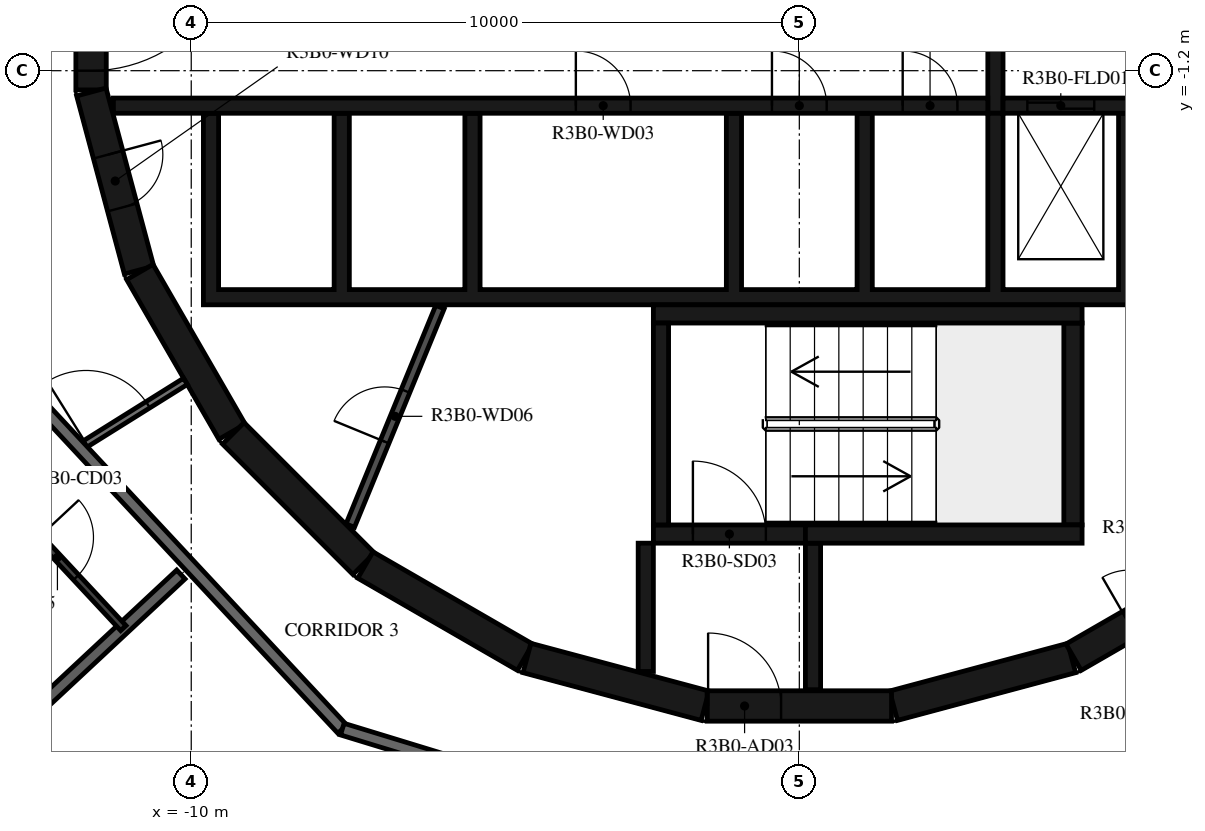
"""IFC4 building model, lengths in metres.
Left out: names, types, materials, properties, quantities, classifications, styles, units other than length and angle.
Written with IfcOpenShell. Run it as: python <this file> out.ifc"""

import sys

from ifc_helpers import new_model, si_unit, direction, frame, frame_2d, origin, place, context, subcontext, project, spatial, polyline, rectangle, outline, extrude, element, fill, save


model = new_model("IFC4")
c1 = context("Model", 3, precision=1e-05, world=origin(), true_north=direction((0.0, 1.0)))
c2 = subcontext(c1, "Body", "Model", "MODEL_VIEW")
j1 = project(units=[si_unit("LENGTHUNIT", "METRE"), si_unit("PLANEANGLEUNIT", "RADIAN")], contexts=[c1])
p1 = place(None, origin())
s1 = spatial("IfcSite", under=j1, at=p1, CompositionType="ELEMENT")
p2 = place(p1, origin())
s2 = spatial("IfcBuilding", under=s1, at=p2, CompositionType="ELEMENT")
p3 = place(p2, frame((0.0, 0.0, 127.4)))
s3 = spatial("IfcBuildingStorey", under=s2, at=p3, CompositionType="ELEMENT", Elevation=127.4)
p4 = place(p3, frame((1.55, -11.643, 0.0), z_axis=(0.0, 0.0, 1.0), x_axis=(0.965948410781, 0.258734743916, 0.0)))
e1 = element("IfcWall", 1, at=p4, inside=s3, PredefinedType="SHEAR", context=c2, shape_type="SweptSolid", body=[
    extrude(rectangle(XDim=3.033, YDim=0.5, at=frame_2d((1.516, 0.0))), origin(), (0.0, 0.0, 1.0), 3.12),
])
p5 = place(p3, frame((4.51, -10.845, 0.0), z_axis=(0.0, 0.0, 1.0), x_axis=(0.865975092491, 0.500087131594, 0.0)))
e2 = element("IfcWall", 2, at=p5, inside=s3, PredefinedType="SHEAR", context=c2, shape_type="SweptSolid", body=[
    extrude(rectangle(XDim=3.033, YDim=0.5, at=frame_2d((1.516, 0.0))), origin(), (0.0, 0.0, 1.0), 3.12),
])
p6 = place(p5, frame((1.066, 0.0, 0.0)))
e3 = element("IfcOpeningElement", 3, at=p6, cuts=e2, PredefinedType="OPENING", context=c2, shape_type="SweptSolid", body=[
    extrude(rectangle(XDim=0.9, YDim=2.1, at=frame_2d((0.45, 1.05))), frame((0.0, 0.26, 0.0), z_axis=(0.0, -1.0, 0.0), x_axis=(1.0, 0.0, 0.0)), (0.0, 0.0, 1.0), 0.52),
])
p7 = place(p3, frame((-11.647, 1.516, 0.0), z_axis=(0.0, 0.0, 1.0), x_axis=(0.0, -1.0, 0.0)))
e4 = element("IfcWall", 4, at=p7, inside=s3, PredefinedType="SHEAR", context=c2, shape_type="SweptSolid", body=[
    extrude(rectangle(XDim=3.033, YDim=0.5, at=frame_2d((1.516, 0.0))), origin(), (0.0, 0.0, 1.0), 3.12),
])
p8 = place(p7, frame((0.316, 0.0, 0.0)))
e5 = element("IfcOpeningElement", 5, at=p8, cuts=e4, PredefinedType="OPENING", context=c2, shape_type="SweptSolid", body=[
    extrude(rectangle(XDim=2.4, YDim=2.1, at=frame_2d((1.2, 1.05))), frame((0.0, 0.26, 0.0), z_axis=(0.0, -1.0, 0.0), x_axis=(1.0, 0.0, 0.0)), (0.0, 0.0, 1.0), 0.52),
])
p9 = place(p3, frame((-11.643, -1.55, 0.0), z_axis=(0.0, 0.0, 1.0), x_axis=(0.258734743916, -0.965948410781, 0.0)))
e6 = element("IfcWall", 6, at=p9, inside=s3, PredefinedType="SHEAR", context=c2, shape_type="SweptSolid", body=[
    extrude(rectangle(XDim=3.033, YDim=0.5, at=frame_2d((1.516, 0.0))), origin(), (0.0, 0.0, 1.0), 3.12),
])
p10 = place(p9, frame((1.066, 0.0, 0.0)))
e7 = element("IfcOpeningElement", 7, at=p10, cuts=e6, PredefinedType="OPENING", context=c2, shape_type="SweptSolid", body=[
    extrude(rectangle(XDim=0.9, YDim=2.1, at=frame_2d((0.45, 1.05))), frame((0.0, 0.26, 0.0), z_axis=(0.0, -1.0, 0.0), x_axis=(1.0, 0.0, 0.0)), (0.0, 0.0, 1.0), 0.52),
])
p11 = place(p3, frame((-10.845, -4.51, 0.0), z_axis=(0.0, 0.0, 1.0), x_axis=(0.500087131594, -0.865975092491, 0.0)))
e8 = element("IfcWall", 8, at=p11, inside=s3, PredefinedType="SHEAR", context=c2, shape_type="SweptSolid", body=[
    extrude(rectangle(XDim=3.033, YDim=0.5, at=frame_2d((1.516, 0.0))), origin(), (0.0, 0.0, 1.0), 3.12),
])
p12 = place(p3, frame((-9.308, -7.164, 0.0), z_axis=(0.0, 0.0, 1.0), x_axis=(0.707106781187, -0.707106781187, 0.0)))
e9 = element("IfcWall", 9, at=p12, inside=s3, PredefinedType="SHEAR", context=c2, shape_type="SweptSolid", body=[
    extrude(rectangle(XDim=3.032, YDim=0.5, at=frame_2d((1.516, 0.0))), origin(), (0.0, 0.0, 1.0), 3.12),
])
for number, where, z_axis, x_axis in (
    (10, (-7.137, -9.329, 0.0), (0.0, 0.0, 1.0), (0.866, -0.5, 0.0)),
    (11, (-4.479, -10.858, 0.0), (0.0, 0.0, 1.0), (0.966, -0.259, 0.0)),
):
    element("IfcWall", number, at=place(p3, frame(where, z_axis=z_axis, x_axis=x_axis)), inside=s3, PredefinedType="SHEAR", context=c2, shape_type="SweptSolid", body=[
        extrude(rectangle(XDim=3.033, YDim=0.5, at=frame_2d((1.516, 0.0))), origin(), (0.0, 0.0, 1.0), 3.12),
    ])
p13 = place(p3, frame((-1.516, -11.647, 0.0), z_axis=(0.0, 0.0, 1.0), x_axis=(1.0, 0.0, 0.0)))
e12 = element("IfcWall", 12, at=p13, inside=s3, PredefinedType="SHEAR", context=c2, shape_type="SweptSolid", body=[
    extrude(rectangle(XDim=3.033, YDim=0.5, at=frame_2d((1.516, 0.0))), origin(), (0.0, 0.0, 1.0), 3.12),
])
p14 = place(p13, frame((0.016, 0.0, 0.0)))
e13 = element("IfcOpeningElement", 13, at=p14, cuts=e12, PredefinedType="OPENING", context=c2, shape_type="SweptSolid", body=[
    extrude(rectangle(XDim=1.2, YDim=2.1, at=frame_2d((0.6, 1.05))), frame((0.0, 0.26, 0.0), z_axis=(0.0, -1.0, 0.0), x_axis=(1.0, 0.0, 0.0)), (0.0, 0.0, 1.0), 0.52),
])
p15 = place(p3, frame((-2.275, -8.67, 0.0), z_axis=(0.0, 0.0, 1.0), x_axis=(0.0, 1.0, 0.0)))
e14 = element("IfcWall", 14, at=p15, inside=s3, PredefinedType="SHEAR", context=c2, shape_type="SweptSolid", body=[
    extrude(rectangle(XDim=3.32, YDim=0.25, at=frame_2d((1.66, 0.0))), origin(), (0.0, 0.0, 1.0), 3.12),
])
p16 = place(p3, frame((-2.4, -5.2, 0.0), z_axis=(0.0, 0.0, 1.0), x_axis=(1.0, 0.0, 0.0)))
e15 = element("IfcWall", 15, at=p16, inside=s3, PredefinedType="SHEAR", context=c2, shape_type="SweptSolid", body=[
    extrude(rectangle(XDim=7.05, YDim=0.3, at=frame_2d((3.525, 0.0))), origin(), (0.0, 0.0, 1.0), 3.12),
])
p17 = place(p3, frame((4.5, -8.67, 0.0), z_axis=(0.0, 0.0, 1.0), x_axis=(0.0, 1.0, 0.0)))
e16 = element("IfcWall", 16, at=p17, inside=s3, PredefinedType="SHEAR", context=c2, shape_type="SweptSolid", body=[
    extrude(rectangle(XDim=3.32, YDim=0.3, at=frame_2d((1.66, 0.0))), origin(), (0.0, 0.0, 1.0), 3.12),
])
p18 = place(p3, frame((0.1, -8.82, 0.0), z_axis=(0.0, 0.0, 1.0), x_axis=(1.0, 0.0, 0.0)))
e17 = element("IfcWall", 17, at=p18, inside=s3, PredefinedType="SHEAR", context=c2, shape_type="SweptSolid", body=[
    extrude(rectangle(XDim=4.55, YDim=0.3, at=frame_2d((2.275, 0.0))), origin(), (0.0, 0.0, 1.0), 3.12),
])
p19 = place(p3, frame((-2.4, -8.82, 0.0), z_axis=(0.0, 0.0, 1.0), x_axis=(1.0, 0.0, 0.0)))
e18 = element("IfcWall", 18, at=p19, inside=s3, PredefinedType="SHEAR", context=c2, shape_type="SweptSolid", body=[
    extrude(rectangle(XDim=2.5, YDim=0.3, at=frame_2d((1.25, 0.0))), origin(), (0.0, 0.0, 1.0), 3.12),
])
p20 = place(p19, frame((0.65, 0.0, 0.0)))
e19 = element("IfcOpeningElement", 19, at=p20, cuts=e18, PredefinedType="OPENING", context=c2, shape_type="SweptSolid", body=[
    extrude(rectangle(XDim=1.2, YDim=2.1, at=frame_2d((0.6, 1.05))), frame((0.0, 0.16, 0.0), z_axis=(0.0, -1.0, 0.0), x_axis=(1.0, 0.0, 0.0)), (0.0, 0.0, 1.0), 0.32),
])
p21 = place(p3, frame((-2.525, -8.97, 0.0), z_axis=(0.0, 0.0, 1.0), x_axis=(0.0, -1.0, 0.0)))
e20 = element("IfcWall", 20, at=p21, inside=s3, PredefinedType="SHEAR", context=c2, shape_type="SweptSolid", body=[
    extrude(rectangle(XDim=2.11, YDim=0.25, at=frame_2d((1.055, 0.0))), origin(), (0.0, 0.0, 1.0), 3.12),
])
p22 = place(p3, frame((0.225, -8.97, 0.0), z_axis=(0.0, 0.0, 1.0), x_axis=(0.0, -1.0, 0.0)))
e21 = element("IfcWall", 21, at=p22, inside=s3, PredefinedType="SHEAR", context=c2, shape_type="SweptSolid", body=[
    extrude(rectangle(XDim=2.41, YDim=0.25, at=frame_2d((1.205, 0.0))), origin(), (0.0, 0.0, 1.0), 3.12),
])
p23 = place(p3, origin())
e22 = element("IfcWall", 22, at=p23, inside=s3, PredefinedType="SHEAR", context=c2, shape_type="SweptSolid", body=[
    extrude(outline(polyline([(9.8, -5.05), (9.8, -4.8), (9.8, -1.9), (9.55, -1.9), (9.55, -4.8), (7.65, -4.8), (7.65, -1.9), (7.4, -1.9), (7.4, -4.8), (5.5, -4.8), (5.5, -1.9), (5.25, -1.9), (5.25, -4.8), (3.35, -4.8), (3.35, -1.9), (3.1, -1.9), (3.1, -4.8), (1.2, -4.8), (1.2, -1.9), (0.95, -1.9), (0.95, -4.8), (-0.95, -4.8), (-0.95, -1.9), (-1.2, -1.9), (-1.2, -4.8), (-5.25, -4.8), (-5.25, -1.9), (-5.5, -1.9), (-5.5, -4.8), (-7.4, -4.8), (-7.4, -1.9), (-7.65, -1.9), (-7.65, -4.8), (-9.55, -4.8), (-9.55, -1.9), (-9.8, -1.9), (-9.8, -4.8), (-9.8, -5.05), (9.8, -5.05)])), origin(), (0.0, 0.0, 1.0), 3.12),
])
p24 = place(p3, frame((-11.28, -1.775, 0.0), z_axis=(0.0, 0.0, 1.0), x_axis=(1.0, 0.0, 0.0)))
e23 = element("IfcWall", 23, at=p24, inside=s3, PredefinedType="SHEAR", context=c2, shape_type="SweptSolid", body=[
    extrude(rectangle(XDim=14.38, YDim=0.25, at=frame_2d((7.19, 0.0))), origin(), (0.0, 0.0, 1.0), 3.12),
])
p25 = place(p24, frame((7.605, 0.0, 0.0)))
e24 = element("IfcOpeningElement", 24, at=p25, cuts=e23, PredefinedType="OPENING", context=c2, shape_type="SweptSolid", body=[
    extrude(rectangle(XDim=0.9, YDim=2.1, at=frame_2d((0.45, 1.05))), frame((0.0, 0.135, 0.0), z_axis=(0.0, -1.0, 0.0), x_axis=(1.0, 0.0, 0.0)), (0.0, 0.0, 1.0), 0.27),
])
p26 = place(p24, frame((10.83, 0.0, 0.0)))
e25 = element("IfcOpeningElement", 25, at=p26, cuts=e23, PredefinedType="OPENING", context=c2, shape_type="SweptSolid", body=[
    extrude(rectangle(XDim=0.9, YDim=2.1, at=frame_2d((0.45, 1.05))), frame((0.0, 0.135, 0.0), z_axis=(0.0, -1.0, 0.0), x_axis=(1.0, 0.0, 0.0)), (0.0, 0.0, 1.0), 0.27),
])
p27 = place(p24, frame((12.98, 0.0, 0.0)))
e26 = element("IfcOpeningElement", 26, at=p27, cuts=e23, PredefinedType="OPENING", context=c2, shape_type="SweptSolid", body=[
    extrude(rectangle(XDim=0.9, YDim=2.1, at=frame_2d((0.45, 1.05))), frame((0.0, 0.135, 0.0), z_axis=(0.0, -1.0, 0.0), x_axis=(1.0, 0.0, 0.0)), (0.0, 0.0, 1.0), 0.27),
])
p28 = place(p3, frame((3.35, -1.775, 0.0), z_axis=(0.0, 0.0, 1.0), x_axis=(1.0, 0.0, 0.0)))
e27 = element("IfcWall", 27, at=p28, inside=s3, PredefinedType="SHEAR", context=c2, shape_type="SweptSolid", body=[
    extrude(rectangle(XDim=7.93, YDim=0.25, at=frame_2d((3.965, 0.0))), origin(), (0.0, 0.0, 1.0), 3.12),
])
p29 = place(p28, frame((0.4, 0.0, 0.0)))
e28 = element("IfcOpeningElement", 28, at=p29, cuts=e27, PredefinedType="OPENING", context=c2, shape_type="SweptSolid", body=[
    extrude(rectangle(XDim=1.1, YDim=2.4, at=frame_2d((0.55, 1.2))), frame((0.0, 0.135, 0.0), z_axis=(0.0, -1.0, 0.0), x_axis=(1.0, 0.0, 0.0)), (0.0, 0.0, 1.0), 0.27),
])
p30 = place(p28, frame((2.55, 0.0, 0.0)))
e29 = element("IfcOpeningElement", 29, at=p30, cuts=e27, PredefinedType="OPENING", context=c2, shape_type="SweptSolid", body=[
    extrude(rectangle(XDim=1.1, YDim=2.4, at=frame_2d((0.55, 1.2))), frame((0.0, 0.135, 0.0), z_axis=(0.0, -1.0, 0.0), x_axis=(1.0, 0.0, 0.0)), (0.0, 0.0, 1.0), 0.27),
])
p31 = place(p28, frame((4.7, 0.0, 0.0)))
e30 = element("IfcOpeningElement", 30, at=p31, cuts=e27, PredefinedType="OPENING", context=c2, shape_type="SweptSolid", body=[
    extrude(rectangle(XDim=1.1, YDim=2.4, at=frame_2d((0.55, 1.2))), frame((0.0, 0.135, 0.0), z_axis=(0.0, -1.0, 0.0), x_axis=(1.0, 0.0, 0.0)), (0.0, 0.0, 1.0), 0.27),
])
p32 = place(p3, frame((3.225, -1.9, 0.0), z_axis=(0.0, 0.0, 1.0), x_axis=(0.0, 1.0, 0.0)))
e31 = element("IfcWall", 31, at=p32, inside=s3, PredefinedType="SHEAR", context=c2, shape_type="SweptSolid", body=[
    extrude(rectangle(XDim=3.8, YDim=0.25, at=frame_2d((1.9, 0.0))), origin(), (0.0, 0.0, 1.0), 3.12),
])
p33 = place(p3, frame((-7.385, -8.681, 0.0), z_axis=(0.0, 0.0, 1.0), x_axis=(0.379804590409, 0.925066739811, 0.0)))
e32 = element("IfcWall", 32, at=p33, inside=s3, PredefinedType="PARTITIONING", context=c2, shape_type="SweptSolid", body=[
    extrude(rectangle(XDim=3.885, YDim=0.15, at=frame_2d((1.942, 0.0))), origin(), (0.0, 0.0, 1.0), 3.12),
])
p34 = place(p33, frame((1.493, 0.0, 0.0)))
e33 = element("IfcOpeningElement", 33, at=p34, cuts=e32, PredefinedType="OPENING", context=c2, shape_type="SweptSolid", body=[
    extrude(rectangle(XDim=0.9, YDim=2.1, at=frame_2d((0.45, 1.05))), frame((0.0, 0.085, 0.0), z_axis=(0.0, -1.0, 0.0), x_axis=(1.0, 0.0, 0.0)), (0.0, 0.0, 1.0), 0.17),
])
p35 = place(p3, frame((-11.836, -7.396, 0.0), z_axis=(0.0, 0.0, 1.0), x_axis=(0.848071831599, 0.529881277692, 0.0)))
e34 = element("IfcWall", 34, at=p35, inside=s3, PredefinedType="PARTITIONING", context=c2, shape_type="SweptSolid", body=[
    extrude(rectangle(XDim=2.052, YDim=0.12, at=frame_2d((1.026, 0.0))), origin(), (0.0, 0.0, 1.0), 3.12),
])
p36 = place(p35, frame((0.125, 0.0, 0.0)))
e35 = element("IfcOpeningElement", 35, at=p36, cuts=e34, PredefinedType="OPENING", context=c2, shape_type="SweptSolid", body=[
    extrude(rectangle(XDim=1.2, YDim=2.1, at=frame_2d((0.6, 1.05))), frame((0.0, 0.07, 0.0), z_axis=(0.0, -1.0, 0.0), x_axis=(1.0, 0.0, 0.0)), (0.0, 0.0, 1.0), 0.14),
])
p37 = place(p3, frame((-12.523, -6.659, 0.0), z_axis=(0.0, 0.0, 1.0), x_axis=(0.682001841105, -0.731350455479, 0.0)))
e36 = element("IfcWall", 36, at=p37, inside=s3, PredefinedType="STANDARD", context=c2, shape_type="SweptSolid", body=[
    extrude(rectangle(XDim=7.342, YDim=0.2, at=frame_2d((3.671, 0.0))), origin(), (0.0, 0.0, 1.0), 3.12),
])
p38 = place(p3, frame((-7.516, -12.028, 0.0), z_axis=(0.0, 0.0, 1.0), x_axis=(0.956306642771, -0.292365533182, 0.0)))
e37 = element("IfcWall", 37, at=p38, inside=s3, PredefinedType="STANDARD", context=c2, shape_type="SweptSolid", body=[
    extrude(rectangle(XDim=7.342, YDim=0.2, at=frame_2d((3.671, 0.0))), origin(), (0.0, 0.0, 1.0), 3.12),
])
p39 = place(p38, frame((6.142, 0.0, 0.0)))
e38 = element("IfcOpeningElement", 38, at=p39, cuts=e37, PredefinedType="OPENING", context=c2, shape_type="SweptSolid", body=[
    extrude(rectangle(XDim=1.0, YDim=2.1, at=frame_2d((0.5, 1.05))), frame((0.0, 0.11, 0.0), z_axis=(0.0, -1.0, 0.0), x_axis=(1.0, 0.0, 0.0)), (0.0, 0.0, 1.0), 0.22),
])
p40 = place(p3, frame((-14.479, -13.504, 0.0), z_axis=(0.0, 0.0, 1.0), x_axis=(0.731329393611, 0.682024426278, 0.0)))
e39 = element("IfcWall", 39, at=p40, inside=s3, PredefinedType="STANDARD", context=c2, shape_type="SweptSolid", body=[
    extrude(rectangle(XDim=5.892, YDim=0.2, at=frame_2d((2.946, 0.0))), origin(), (0.0, 0.0, 1.0), 3.12),
])
p41 = place(p3, frame((-13.894, -7.388, 0.0), z_axis=(0.0, 0.0, 1.0), x_axis=(0.681978591143, -0.731372135935, 0.0)))
e40 = element("IfcWall", 40, at=p41, inside=s3, PredefinedType="PARTITIONING", context=c2, shape_type="SweptSolid", body=[
    extrude(rectangle(XDim=4.073, YDim=0.12, at=frame_2d((2.036, 0.0))), origin(), (0.0, 0.0, 1.0), 3.12),
])
p42 = place(p41, frame((2.033, 0.0, 0.0)))
e41 = element("IfcOpeningElement", 41, at=p42, cuts=e40, PredefinedType="OPENING", context=c2, shape_type="SweptSolid", body=[
    extrude(rectangle(XDim=0.9, YDim=2.1, at=frame_2d((0.45, 1.05))), frame((0.0, 0.07, 0.0), z_axis=(0.0, -1.0, 0.0), x_axis=(1.0, 0.0, 0.0)), (0.0, 0.0, 1.0), 0.14),
])
p43 = place(p3, frame((-13.939, -18.911, 0.0), z_axis=(0.0, 0.0, 1.0), x_axis=(0.974369607456, 0.224953035245, 0.0)))
e42 = element("IfcWall", 42, at=p43, inside=s3, PredefinedType="PARTITIONING", context=c2, shape_type="SweptSolid", body=[
    extrude(rectangle(XDim=33.934, YDim=0.12, at=frame_2d((16.967, 0.0))), origin(), (0.0, 0.0, 1.0), 3.12),
])
p44 = place(p43, frame((2.0, 0.0, 0.0)))
e43 = element("IfcOpeningElement", 43, at=p44, cuts=e42, PredefinedType="OPENING", context=c2, shape_type="SweptSolid", body=[
    extrude(rectangle(XDim=0.9, YDim=2.1, at=frame_2d((0.45, 1.05))), frame((0.0, 0.07, 0.0), z_axis=(0.0, -1.0, 0.0), x_axis=(1.0, 0.0, 0.0)), (0.0, 0.0, 1.0), 0.14),
])
p45 = place(p43, frame((28.154, 0.0, 0.0)))
e44 = element("IfcOpeningElement", 44, at=p45, cuts=e42, PredefinedType="OPENING", context=c2, shape_type="SweptSolid", body=[
    extrude(rectangle(XDim=0.9, YDim=2.1, at=frame_2d((0.45, 1.05))), frame((0.0, 0.07, 0.0), z_axis=(0.0, -1.0, 0.0), x_axis=(1.0, 0.0, 0.0)), (0.0, 0.0, 1.0), 0.14),
])
p46 = place(p43, frame((30.039, 0.0, 0.0)))
e45 = element("IfcOpeningElement", 45, at=p46, cuts=e42, PredefinedType="OPENING", context=c2, shape_type="SweptSolid", body=[
    extrude(rectangle(XDim=0.9, YDim=2.1, at=frame_2d((0.45, 1.05))), frame((0.0, 0.07, 0.0), z_axis=(0.0, -1.0, 0.0), x_axis=(1.0, 0.0, 0.0)), (0.0, 0.0, 1.0), 0.14),
])
p47 = place(p20, origin())
e46 = element("IfcDoor", 46, at=p47, inside=s3, OperationType="SINGLE_SWING_LEFT", PredefinedType="DOOR", context=c2, shape_type="SweptSolid", body=[
    extrude(rectangle(XDim=1.2, YDim=2.1, at=frame_2d((0.6, 1.05))), frame((0.0, 0.025, 0.0), z_axis=(0.0, -1.0, 0.0), x_axis=(1.0, 0.0, 0.0)), (0.0, 0.0, 1.0), 0.05),
])
fill(e19, e46)
p48 = place(p14, origin())
e47 = element("IfcDoor", 47, at=p48, inside=s3, OperationType="SINGLE_SWING_RIGHT", PredefinedType="DOOR", context=c2, shape_type="SweptSolid", body=[
    extrude(rectangle(XDim=1.2, YDim=2.1, at=frame_2d((0.6, 1.05))), frame((0.0, 0.025, 0.0), z_axis=(0.0, -1.0, 0.0), x_axis=(1.0, 0.0, 0.0)), (0.0, 0.0, 1.0), 0.05),
])
fill(e13, e47)
p49 = place(p8, origin())
e48 = element("IfcDoor", 48, at=p49, inside=s3, OperationType="DOUBLE_DOOR_SINGLE_SWING", PredefinedType="DOOR", context=c2, shape_type="SweptSolid", body=[
    extrude(rectangle(XDim=2.4, YDim=2.1, at=frame_2d((1.2, 1.05))), frame((0.0, 0.025, 0.0), z_axis=(0.0, -1.0, 0.0), x_axis=(1.0, 0.0, 0.0)), (0.0, 0.0, 1.0), 0.05),
])
fill(e5, e48)
p50 = place(p29, origin())
e49 = element("IfcDoor", 49, at=p50, inside=s3, OperationType="DOUBLE_DOOR_SLIDING", PredefinedType="DOOR", context=c2, shape_type="SweptSolid", body=[
    extrude(rectangle(XDim=1.1, YDim=2.4, at=frame_2d((0.55, 1.2))), frame((0.0, 0.025, 0.0), z_axis=(0.0, -1.0, 0.0), x_axis=(1.0, 0.0, 0.0)), (0.0, 0.0, 1.0), 0.05),
])
fill(e28, e49)
p51 = place(p25, origin())
e50 = element("IfcDoor", 50, at=p51, inside=s3, OperationType="SINGLE_SWING_RIGHT", PredefinedType="DOOR", context=c2, shape_type="SweptSolid", body=[
    extrude(rectangle(XDim=0.9, YDim=2.1, at=frame_2d((0.45, 1.05))), frame((0.0, 0.025, 0.0), z_axis=(0.0, -1.0, 0.0), x_axis=(1.0, 0.0, 0.0)), (0.0, 0.0, 1.0), 0.05),
])
fill(e24, e50)
p52 = place(p26, origin())
e51 = element("IfcDoor", 51, at=p52, inside=s3, OperationType="SINGLE_SWING_LEFT", PredefinedType="DOOR", context=c2, shape_type="SweptSolid", body=[
    extrude(rectangle(XDim=0.9, YDim=2.1, at=frame_2d((0.45, 1.05))), frame((0.0, 0.025, 0.0), z_axis=(0.0, -1.0, 0.0), x_axis=(1.0, 0.0, 0.0)), (0.0, 0.0, 1.0), 0.05),
])
fill(e25, e51)
p53 = place(p27, origin())
e52 = element("IfcDoor", 52, at=p53, inside=s3, OperationType="SINGLE_SWING_RIGHT", PredefinedType="DOOR", context=c2, shape_type="SweptSolid", body=[
    extrude(rectangle(XDim=0.9, YDim=2.1, at=frame_2d((0.45, 1.05))), frame((0.0, 0.025, 0.0), z_axis=(0.0, -1.0, 0.0), x_axis=(1.0, 0.0, 0.0)), (0.0, 0.0, 1.0), 0.05),
])
fill(e26, e52)
p54 = place(p34, origin())
e53 = element("IfcDoor", 53, at=p54, inside=s3, OperationType="SINGLE_SWING_LEFT", PredefinedType="DOOR", context=c2, shape_type="SweptSolid", body=[
    extrude(rectangle(XDim=0.9, YDim=2.1, at=frame_2d((0.45, 1.05))), frame((0.0, 0.025, 0.0), z_axis=(0.0, -1.0, 0.0), x_axis=(1.0, 0.0, 0.0)), (0.0, 0.0, 1.0), 0.05),
])
fill(e33, e53)
p55 = place(p10, origin())
e54 = element("IfcDoor", 54, at=p55, inside=s3, OperationType="SINGLE_SWING_LEFT", PredefinedType="DOOR", context=c2, shape_type="SweptSolid", body=[
    extrude(rectangle(XDim=0.9, YDim=2.1, at=frame_2d((0.45, 1.05))), frame((0.0, 0.025, 0.0), z_axis=(0.0, -1.0, 0.0), x_axis=(1.0, 0.0, 0.0)), (0.0, 0.0, 1.0), 0.05),
])
fill(e7, e54)
p56 = place(p42, origin())
e55 = element("IfcDoor", 55, at=p56, inside=s3, OperationType="SINGLE_SWING_RIGHT", PredefinedType="DOOR", context=c2, shape_type="SweptSolid", body=[
    extrude(rectangle(XDim=0.9, YDim=2.1, at=frame_2d((0.45, 1.05))), frame((0.0, 0.025, 0.0), z_axis=(0.0, -1.0, 0.0), x_axis=(1.0, 0.0, 0.0)), (0.0, 0.0, 1.0), 0.05),
])
fill(e41, e55)
p57 = place(p36, origin())
e56 = element("IfcDoor", 56, at=p57, inside=s3, OperationType="DOUBLE_DOOR_SINGLE_SWING", PredefinedType="DOOR", context=c2, shape_type="SweptSolid", body=[
    extrude(rectangle(XDim=1.2, YDim=2.1, at=frame_2d((0.6, 1.05))), frame((0.0, 0.025, 0.0), z_axis=(0.0, -1.0, 0.0), x_axis=(1.0, 0.0, 0.0)), (0.0, 0.0, 1.0), 0.05),
])
fill(e35, e56)
save(model, sys.argv[1])
